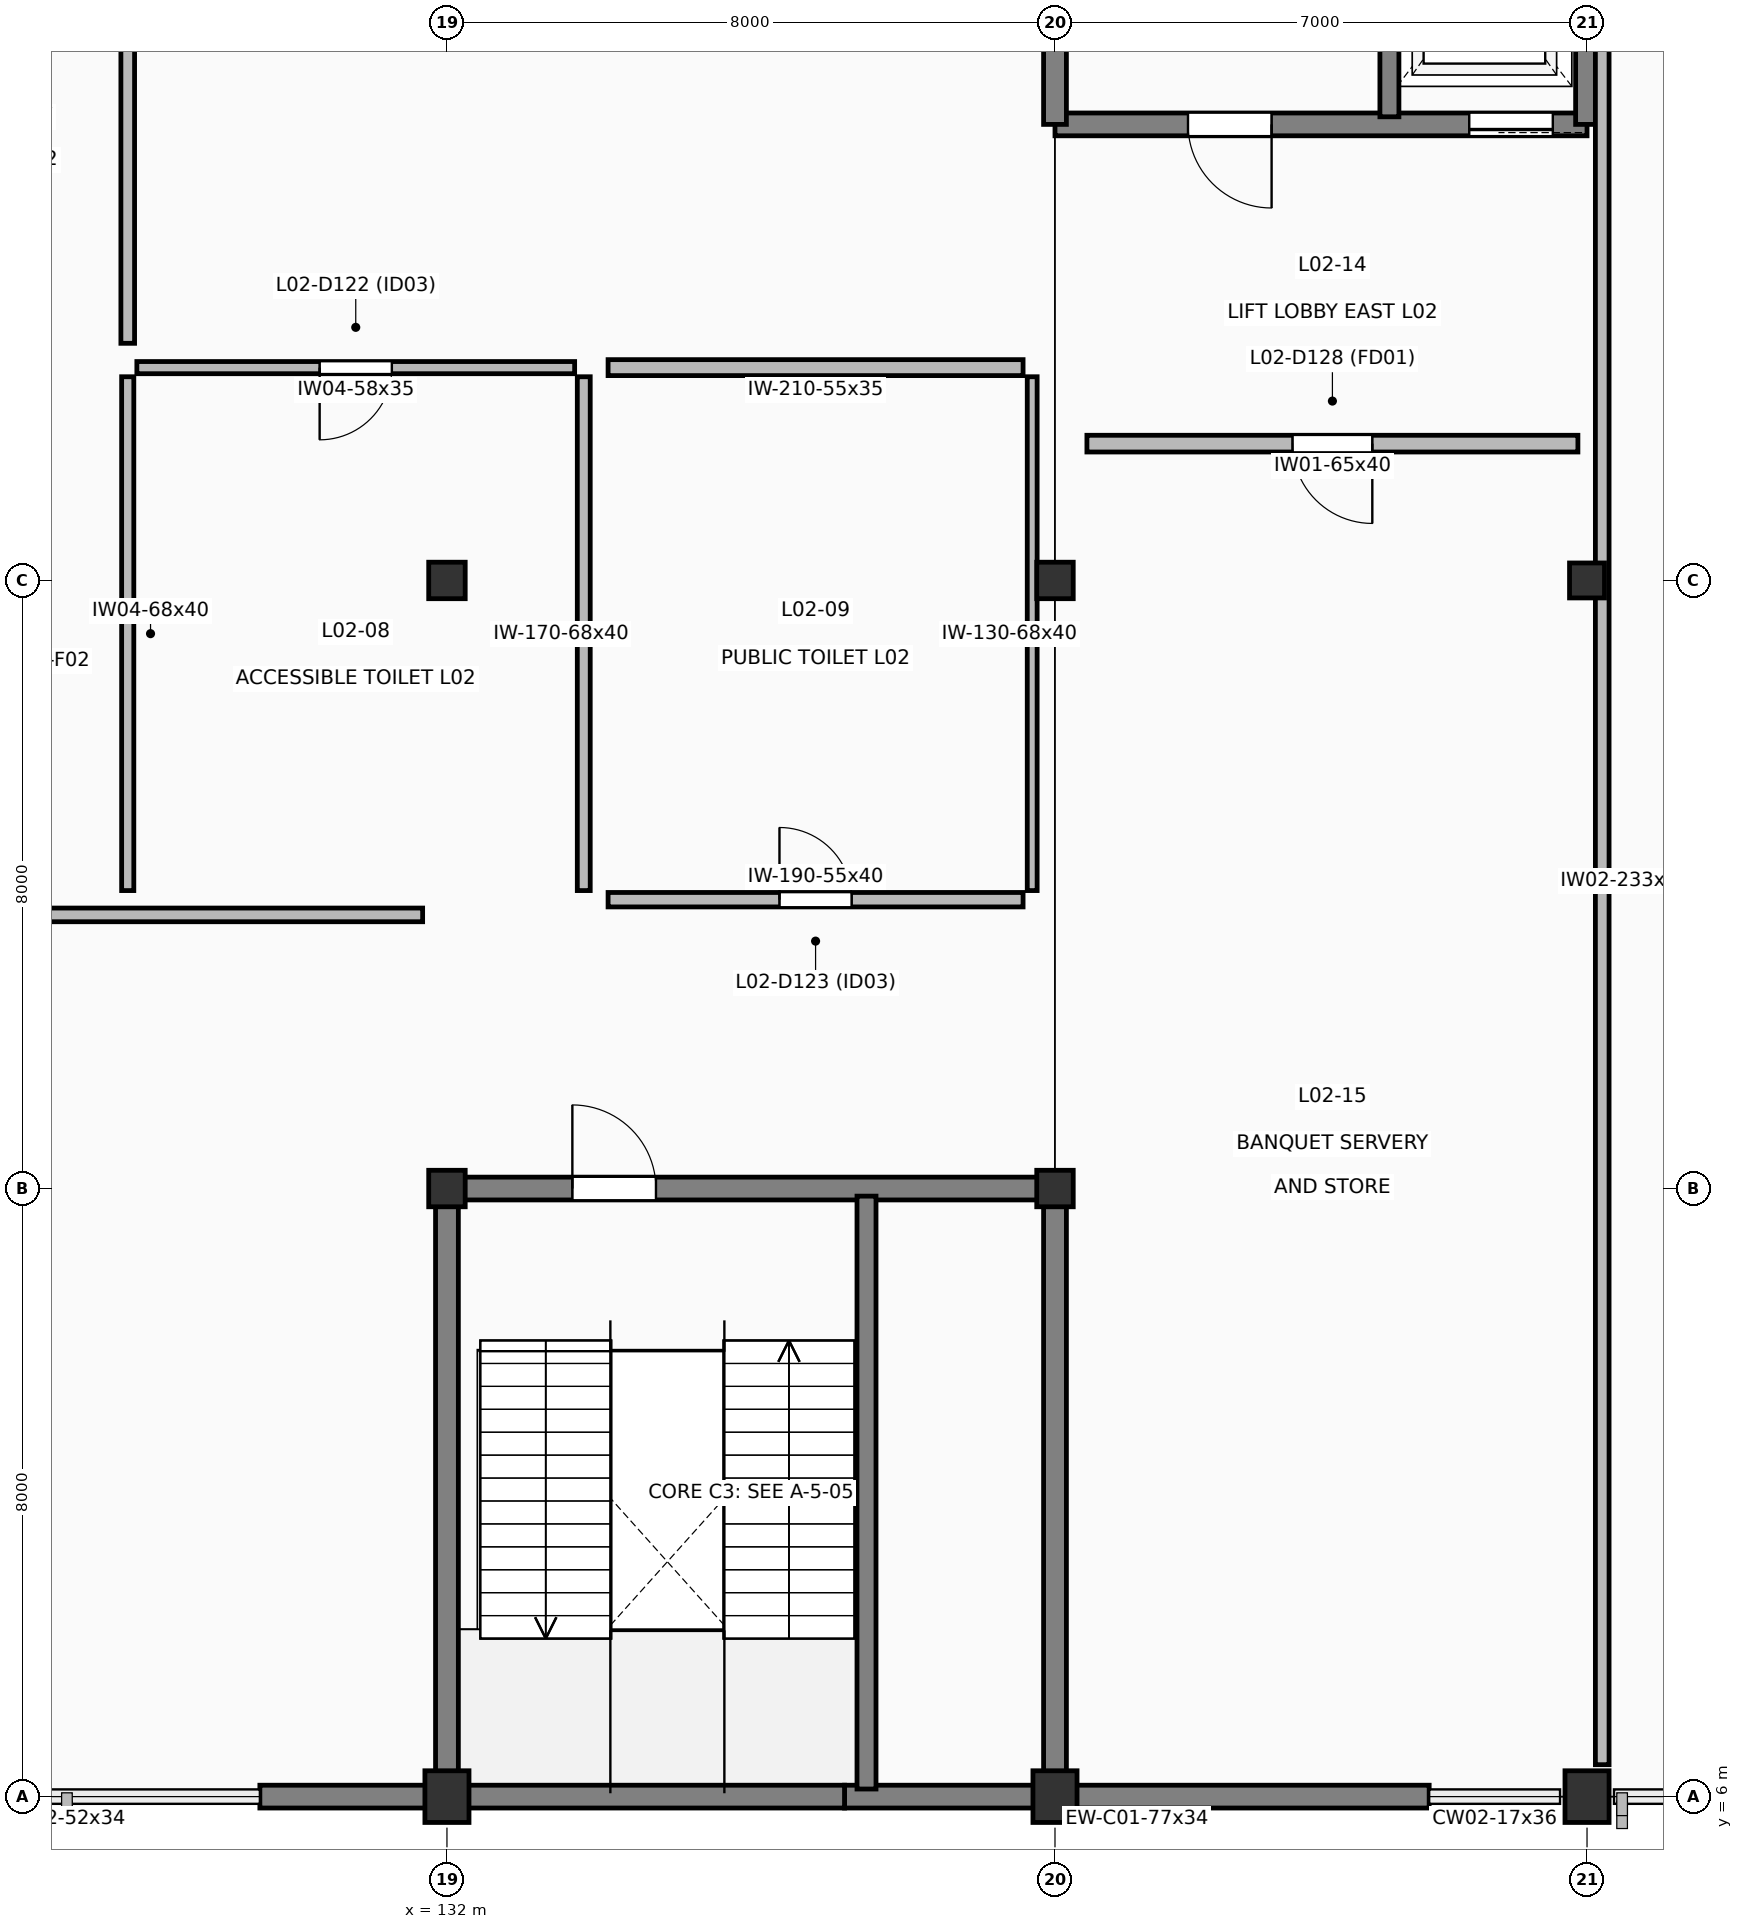
"""IFC4 building model, lengths in metres.
Left out: names, types, materials, properties, quantities, classifications, styles, units other than length and angle.
Written with IfcOpenShell. Run it as: python <this file> out.ifc"""

import sys

from ifc_helpers import new_model, si_unit, direction, frame, frame_2d, origin, origin_2d, place, context, subcontext, project, spatial, rectangle, extrude, element, fill, save


model = new_model("IFC4")
c1 = context("Model", 3, precision=1e-05, world=origin(), true_north=direction((0.0, 1.0)))
c2 = subcontext(c1, "Body", "Model", "MODEL_VIEW")
j1 = project(units=[si_unit("LENGTHUNIT", "METRE"), si_unit("PLANEANGLEUNIT", "RADIAN")], contexts=[c1])
p1 = place(None, origin())
s1 = spatial("IfcSite", under=j1, at=p1, CompositionType="ELEMENT")
p2 = place(p1, origin())
s2 = spatial("IfcBuilding", under=s1, at=p2, CompositionType="ELEMENT")
p3 = place(p2, frame((0.0, 0.0, 9.6)))
s3 = spatial("IfcBuildingStorey", under=s2, at=p3, CompositionType="ELEMENT", Elevation=9.6)
p4 = place(p3, frame((132.0, 6.0, 0.0), z_axis=(0.0, 0.0, 1.0), x_axis=(1.0, 0.0, 0.0)))
e1 = element("IfcColumn", 1, at=p4, inside=s3, PredefinedType="PILASTER", context=c2, shape_type="SweptSolid", body=[
    extrude(rectangle(XDim=0.58, YDim=0.68, at=origin_2d()), origin(), (0.0, 0.0, 1.0), 4.2),
])
for number, where, z_axis, x_axis in (
    (2, (132.0, 14.0, 0.0), (0.0, 0.0, 1.0), (1.0, 0.0, 0.0)),
    (3, (132.0, 22.0, 0.0), (0.0, 0.0, 1.0), (1.0, 0.0, 0.0)),
):
    element("IfcColumn", number, at=place(p3, frame(where, z_axis=z_axis, x_axis=x_axis)), inside=s3, PredefinedType="COLUMN", context=c2, shape_type="SweptSolid", body=[
        extrude(rectangle(XDim=0.48, YDim=0.48, at=origin_2d()), origin(), (0.0, 0.0, 1.0), 4.2),
    ])
p5 = place(p3, frame((140.0, 6.0, 0.0), z_axis=(0.0, 0.0, 1.0), x_axis=(1.0, 0.0, 0.0)))
e4 = element("IfcColumn", 4, at=p5, inside=s3, PredefinedType="PILASTER", context=c2, shape_type="SweptSolid", body=[
    extrude(rectangle(XDim=0.58, YDim=0.68, at=origin_2d()), origin(), (0.0, 0.0, 1.0), 4.2),
])
for number, where, z_axis, x_axis in (
    (5, (140.0, 14.0, 0.0), (0.0, 0.0, 1.0), (1.0, 0.0, 0.0)),
    (6, (140.0, 22.0, 0.0), (0.0, 0.0, 1.0), (1.0, 0.0, 0.0)),
):
    element("IfcColumn", number, at=place(p3, frame(where, z_axis=z_axis, x_axis=x_axis)), inside=s3, PredefinedType="COLUMN", context=c2, shape_type="SweptSolid", body=[
        extrude(rectangle(XDim=0.48, YDim=0.48, at=origin_2d()), origin(), (0.0, 0.0, 1.0), 4.2),
    ])
p6 = place(p3, frame((147.0, 6.0, 0.0), z_axis=(0.0, 0.0, 1.0), x_axis=(1.0, 0.0, 0.0)))
e7 = element("IfcColumn", 7, at=p6, inside=s3, PredefinedType="PILASTER", context=c2, shape_type="SweptSolid", body=[
    extrude(rectangle(XDim=0.58, YDim=0.68, at=origin_2d()), origin(), (0.0, 0.0, 1.0), 4.2),
])
p7 = place(p3, frame((147.0, 22.0, 0.0), z_axis=(0.0, 0.0, 1.0), x_axis=(1.0, 0.0, 0.0)))
e8 = element("IfcColumn", 8, at=p7, inside=s3, PredefinedType="COLUMN", context=c2, shape_type="SweptSolid", body=[
    extrude(rectangle(XDim=0.46, YDim=0.46, at=origin_2d()), origin(), (0.0, 0.0, 1.0), 4.2),
])
p8 = place(p3, frame((144.923, 6.0, 0.0), z_axis=(0.0, 0.0, 1.0), x_axis=(-1.0, 0.0, 0.0)))
e9 = element("IfcWall", 9, at=p8, inside=s3, PredefinedType="SOLIDWALL", context=c2, shape_type="SweptSolid", body=[
    extrude(rectangle(XDim=7.692, YDim=0.3, at=frame_2d((3.846, 0.0))), origin(), (0.0, 0.0, 1.0), 4.2),
])
p9 = place(p3, frame((137.231, 6.0, 0.0), z_axis=(0.0, 0.0, 1.0), x_axis=(-1.0, 0.0, 0.0)))
e10 = element("IfcWall", 10, at=p9, inside=s3, PredefinedType="SOLIDWALL", context=c2, shape_type="SweptSolid", body=[
    extrude(rectangle(XDim=7.692, YDim=0.3, at=frame_2d((3.846, 0.0))), origin(), (0.0, 0.0, 1.0), 4.2),
])
p10 = place(p3, frame((132.0, 6.0, 0.0), z_axis=(0.0, 0.0, 1.0), x_axis=(0.0, 1.0, 0.0)))
e11 = element("IfcWall", 11, at=p10, inside=s3, PredefinedType="SHEAR", context=c2, shape_type="SweptSolid", body=[
    extrude(rectangle(XDim=8.0, YDim=0.3, at=frame_2d((4.0, 0.0))), origin(), (0.0, 0.0, 1.0), 4.2),
])
p11 = place(p3, frame((132.0, 14.0, 0.0), z_axis=(0.0, 0.0, 1.0), x_axis=(1.0, 0.0, 0.0)))
e12 = element("IfcWall", 12, at=p11, inside=s3, PredefinedType="SHEAR", context=c2, shape_type="SweptSolid", body=[
    extrude(rectangle(XDim=8.0, YDim=0.3, at=frame_2d((4.0, 0.0))), origin(), (0.0, 0.0, 1.0), 4.2),
])
p12 = place(p11, frame((1.65, 0.0, 0.0)))
e13 = element("IfcOpeningElement", 13, at=p12, cuts=e12, PredefinedType="OPENING", context=c2, shape_type="SweptSolid", body=[
    extrude(rectangle(XDim=1.1, YDim=2.2, at=frame_2d((0.55, 1.1))), frame((0.0, 0.16, 0.0), z_axis=(0.0, -1.0, 0.0), x_axis=(1.0, 0.0, 0.0)), (0.0, 0.0, 1.0), 0.32),
])
p13 = place(p3, frame((140.0, 14.0, 0.0), z_axis=(0.0, 0.0, 1.0), x_axis=(0.0, -1.0, 0.0)))
e14 = element("IfcWall", 14, at=p13, inside=s3, PredefinedType="SHEAR", context=c2, shape_type="SweptSolid", body=[
    extrude(rectangle(XDim=8.0, YDim=0.3, at=frame_2d((4.0, 0.0))), origin(), (0.0, 0.0, 1.0), 4.2),
])
p14 = place(p3, frame((137.52, 6.1, 0.0), z_axis=(0.0, 0.0, 1.0), x_axis=(0.0, 1.0, 0.0)))
e15 = element("IfcWall", 15, at=p14, inside=s3, PredefinedType="SHEAR", context=c2, shape_type="SweptSolid", body=[
    extrude(rectangle(XDim=7.8, YDim=0.25, at=frame_2d((3.9, 0.0))), origin(), (0.0, 0.0, 1.0), 4.2),
])
p15 = place(p3, frame((147.0, 28.0, 0.0), z_axis=(0.0, 0.0, 1.0), x_axis=(-1.0, 0.0, 0.0)))
e16 = element("IfcWall", 16, at=p15, inside=s3, PredefinedType="SHEAR", context=c2, shape_type="SweptSolid", body=[
    extrude(rectangle(XDim=7.0, YDim=0.3, at=frame_2d((3.5, 0.0))), origin(), (0.0, 0.0, 1.0), 4.2),
])
p16 = place(p15, frame((4.15, 0.0, 0.0)))
e17 = element("IfcOpeningElement", 17, at=p16, cuts=e16, PredefinedType="OPENING", context=c2, shape_type="SweptSolid", body=[
    extrude(rectangle(XDim=1.1, YDim=2.2, at=frame_2d((0.55, 1.1))), frame((0.0, 0.16, 0.0), z_axis=(0.0, -1.0, 0.0), x_axis=(1.0, 0.0, 0.0)), (0.0, 0.0, 1.0), 0.32),
])
p17 = place(p15, frame((0.45, 0.0, 0.0)))
e18 = element("IfcOpeningElement", 18, at=p17, cuts=e16, PredefinedType="OPENING", context=c2, shape_type="SweptSolid", body=[
    extrude(rectangle(XDim=1.1, YDim=2.2, at=frame_2d((0.55, 1.1))), frame((0.0, 0.16, 0.0), z_axis=(0.0, -1.0, 0.0), x_axis=(1.0, 0.0, 0.0)), (0.0, 0.0, 1.0), 0.32),
])
for number, where, z_axis, x_axis in (
    (19, (140.0, 28.0, 0.0), (0.0, 0.0, 1.0), (0.0, 1.0, 0.0)),
    (20, (147.0, 36.0, 0.0), (0.0, 0.0, 1.0), (0.0, -1.0, 0.0)),
):
    element("IfcWall", number, at=place(p3, frame(where, z_axis=z_axis, x_axis=x_axis)), inside=s3, PredefinedType="SHEAR", context=c2, shape_type="SweptSolid", body=[
        extrude(rectangle(XDim=8.0, YDim=0.3, at=frame_2d((4.0, 0.0))), origin(), (0.0, 0.0, 1.0), 4.2),
    ])
p18 = place(p3, frame((144.4, 28.1, 0.0), z_axis=(0.0, 0.0, 1.0), x_axis=(0.0, 1.0, 0.0)))
e21 = element("IfcWall", 21, at=p18, inside=s3, PredefinedType="SHEAR", context=c2, shape_type="SweptSolid", body=[
    extrude(rectangle(XDim=7.8, YDim=0.25, at=frame_2d((3.9, 0.0))), origin(), (0.0, 0.0, 1.0), 4.2),
])
p19 = place(p3, frame((131.68, 17.6, 0.0), z_axis=(0.0, 0.0, 1.0), x_axis=(-1.0, 0.0, 0.0)))
e22 = element("IfcWall", 22, at=p19, inside=s3, PredefinedType="PARTITIONING", context=c2, shape_type="SweptSolid", body=[
    extrude(rectangle(XDim=23.36, YDim=0.18, at=frame_2d((11.68, 0.0))), origin(), (0.0, 0.0, 1.0), 3.98),
])
p20 = place(p19, frame((11.18, 0.0, 0.0)))
e23 = element("IfcOpeningElement", 23, at=p20, cuts=e22, PredefinedType="OPENING", context=c2, shape_type="SweptSolid", body=[
    extrude(rectangle(XDim=1.0, YDim=2.15, at=frame_2d((0.5, 1.075))), frame((0.0, 0.1, 0.0), z_axis=(0.0, -1.0, 0.0), x_axis=(1.0, 0.0, 0.0)), (0.0, 0.0, 1.0), 0.2),
])
p21 = place(p3, frame((133.68, 24.8, 0.0), z_axis=(0.0, 0.0, 1.0), x_axis=(-1.0, 0.0, 0.0)))
e24 = element("IfcWall", 24, at=p21, inside=s3, PredefinedType="PLUMBINGWALL", context=c2, shape_type="SweptSolid", body=[
    extrude(rectangle(XDim=5.76, YDim=0.16, at=frame_2d((2.88, 0.0))), origin(), (0.0, 0.0, 1.0), 3.525),
])
p22 = place(p21, frame((2.405, 0.0, 0.0)))
e25 = element("IfcOpeningElement", 25, at=p22, cuts=e24, PredefinedType="OPENING", context=c2, shape_type="SweptSolid", body=[
    extrude(rectangle(XDim=0.95, YDim=2.15, at=frame_2d((0.475, 1.075))), frame((0.0, 0.09, 0.0), z_axis=(0.0, -1.0, 0.0), x_axis=(1.0, 0.0, 0.0)), (0.0, 0.0, 1.0), 0.18),
])
p23 = place(p3, frame((127.8, 24.68, 0.0), z_axis=(0.0, 0.0, 1.0), x_axis=(0.0, -1.0, 0.0)))
e26 = element("IfcWall", 26, at=p23, inside=s3, PredefinedType="PLUMBINGWALL", context=c2, shape_type="SweptSolid", body=[
    extrude(rectangle(XDim=6.76, YDim=0.16, at=frame_2d((3.38, 0.0))), origin(), (0.0, 0.0, 1.0), 3.98),
])
p24 = place(p3, frame((133.8, 17.92, 0.0), z_axis=(0.0, 0.0, 1.0), x_axis=(0.0, 1.0, 0.0)))
e27 = element("IfcWall", 27, at=p24, inside=s3, PredefinedType="PARTITIONING", context=c2, shape_type="SweptSolid", body=[
    extrude(rectangle(XDim=6.76, YDim=0.17, at=frame_2d((3.38, 0.0))), origin(), (0.0, 0.0, 1.0), 3.98),
])
p25 = place(p3, frame((134.12, 17.8, 0.0), z_axis=(0.0, 0.0, 1.0), x_axis=(1.0, 0.0, 0.0)))
e28 = element("IfcWall", 28, at=p25, inside=s3, PredefinedType="PARTITIONING", context=c2, shape_type="SweptSolid", body=[
    extrude(rectangle(XDim=5.46, YDim=0.19, at=frame_2d((2.73, 0.0))), origin(), (0.0, 0.0, 1.0), 3.98),
])
p26 = place(p25, frame((2.255, 0.0, 0.0)))
e29 = element("IfcOpeningElement", 29, at=p26, cuts=e28, PredefinedType="OPENING", context=c2, shape_type="SweptSolid", body=[
    extrude(rectangle(XDim=0.95, YDim=2.15, at=frame_2d((0.475, 1.075))), frame((0.0, 0.105, 0.0), z_axis=(0.0, -1.0, 0.0), x_axis=(1.0, 0.0, 0.0)), (0.0, 0.0, 1.0), 0.21),
])
p27 = place(p3, frame((139.58, 24.8, 0.0), z_axis=(0.0, 0.0, 1.0), x_axis=(-1.0, 0.0, 0.0)))
e30 = element("IfcWall", 30, at=p27, inside=s3, PredefinedType="PARTITIONING", context=c2, shape_type="SweptSolid", body=[
    extrude(rectangle(XDim=5.46, YDim=0.21, at=frame_2d((2.73, 0.0))), origin(), (0.0, 0.0, 1.0), 3.525),
])
p28 = place(p3, frame((139.7, 17.92, 0.0), z_axis=(0.0, 0.0, 1.0), x_axis=(0.0, 1.0, 0.0)))
e31 = element("IfcWall", 31, at=p28, inside=s3, PredefinedType="PARTITIONING", context=c2, shape_type="SweptSolid", body=[
    extrude(rectangle(XDim=6.76, YDim=0.13, at=frame_2d((3.38, 0.0))), origin(), (0.0, 0.0, 1.0), 3.98),
])
p29 = place(p3, frame((127.8, 42.88, 0.0), z_axis=(0.0, 0.0, 1.0), x_axis=(0.0, -1.0, 0.0)))
e32 = element("IfcWall", 32, at=p29, inside=s3, PredefinedType="PARTITIONING", context=c2, shape_type="SweptSolid", body=[
    extrude(rectangle(XDim=17.76, YDim=0.18, at=frame_2d((8.88, 0.0))), origin(), (0.0, 0.0, 1.0), 3.98),
])
p30 = place(p3, frame((147.2, 29.68, 0.0), z_axis=(0.0, 0.0, 1.0), x_axis=(0.0, -1.0, 0.0)))
e33 = element("IfcWall", 33, at=p30, inside=s3, PredefinedType="PARTITIONING", context=c2, shape_type="SweptSolid", body=[
    extrude(rectangle(XDim=23.26, YDim=0.18, at=frame_2d((11.63, 0.0))), origin(), (0.0, 0.0, 1.0), 3.98),
])
p31 = place(p3, frame((146.88, 23.8, 0.0), z_axis=(0.0, 0.0, 1.0), x_axis=(-1.0, 0.0, 0.0)))
e34 = element("IfcWall", 34, at=p31, inside=s3, PredefinedType="SOLIDWALL", context=c2, shape_type="SweptSolid", body=[
    extrude(rectangle(XDim=6.46, YDim=0.22, at=frame_2d((3.23, 0.0))), origin(), (0.0, 0.0, 1.0), 3.98),
])
p32 = place(p31, frame((2.705, 0.0, 0.0)))
e35 = element("IfcOpeningElement", 35, at=p32, cuts=e34, PredefinedType="OPENING", context=c2, shape_type="SweptSolid", body=[
    extrude(rectangle(XDim=1.05, YDim=2.2, at=frame_2d((0.525, 1.1))), frame((0.0, 0.12, 0.0), z_axis=(0.0, -1.0, 0.0), x_axis=(1.0, 0.0, 0.0)), (0.0, 0.0, 1.0), 0.24),
])
p33 = place(p12, origin())
e36 = element("IfcDoor", 36, at=p33, inside=s3, OperationType="SINGLE_SWING_LEFT", PredefinedType="DOOR", context=c2, shape_type="SweptSolid", body=[
    extrude(rectangle(XDim=1.1, YDim=2.2, at=frame_2d((0.55, 1.1))), frame((0.0, 0.025, 0.0), z_axis=(0.0, -1.0, 0.0), x_axis=(1.0, 0.0, 0.0)), (0.0, 0.0, 1.0), 0.05),
])
fill(e13, e36)
p34 = place(p16, origin())
e37 = element("IfcDoor", 37, at=p34, inside=s3, OperationType="SINGLE_SWING_LEFT", PredefinedType="DOOR", context=c2, shape_type="SweptSolid", body=[
    extrude(rectangle(XDim=1.1, YDim=2.2, at=frame_2d((0.55, 1.1))), frame((0.0, 0.025, 0.0), z_axis=(0.0, -1.0, 0.0), x_axis=(1.0, 0.0, 0.0)), (0.0, 0.0, 1.0), 0.05),
])
fill(e17, e37)
p35 = place(p17, origin())
e38 = element("IfcDoor", 38, at=p35, inside=s3, OperationType="SLIDING_TO_LEFT", PredefinedType="DOOR", context=c2, shape_type="SweptSolid", body=[
    extrude(rectangle(XDim=1.1, YDim=2.2, at=frame_2d((0.55, 1.1))), frame((0.0, 0.025, 0.0), z_axis=(0.0, -1.0, 0.0), x_axis=(1.0, 0.0, 0.0)), (0.0, 0.0, 1.0), 0.05),
])
fill(e18, e38)
p36 = place(p22, origin())
e39 = element("IfcDoor", 39, at=p36, inside=s3, OperationType="SINGLE_SWING_RIGHT", PredefinedType="DOOR", context=c2, shape_type="SweptSolid", body=[
    extrude(rectangle(XDim=0.95, YDim=2.15, at=frame_2d((0.475, 1.075))), frame((0.0, 0.025, 0.0), z_axis=(0.0, -1.0, 0.0), x_axis=(1.0, 0.0, 0.0)), (0.0, 0.0, 1.0), 0.05),
])
fill(e25, e39)
p37 = place(p26, origin())
e40 = element("IfcDoor", 40, at=p37, inside=s3, OperationType="SINGLE_SWING_LEFT", PredefinedType="DOOR", context=c2, shape_type="SweptSolid", body=[
    extrude(rectangle(XDim=0.95, YDim=2.15, at=frame_2d((0.475, 1.075))), frame((0.0, 0.025, 0.0), z_axis=(0.0, -1.0, 0.0), x_axis=(1.0, 0.0, 0.0)), (0.0, 0.0, 1.0), 0.05),
])
fill(e29, e40)
p38 = place(p32, origin())
e41 = element("IfcDoor", 41, at=p38, inside=s3, OperationType="SINGLE_SWING_LEFT", PredefinedType="DOOR", context=c2, shape_type="SweptSolid", body=[
    extrude(rectangle(XDim=1.05, YDim=2.2, at=frame_2d((0.525, 1.1))), frame((0.0, 0.025, 0.0), z_axis=(0.0, -1.0, 0.0), x_axis=(1.0, 0.0, 0.0)), (0.0, 0.0, 1.0), 0.05),
])
fill(e35, e41)
save(model, sys.argv[1])
